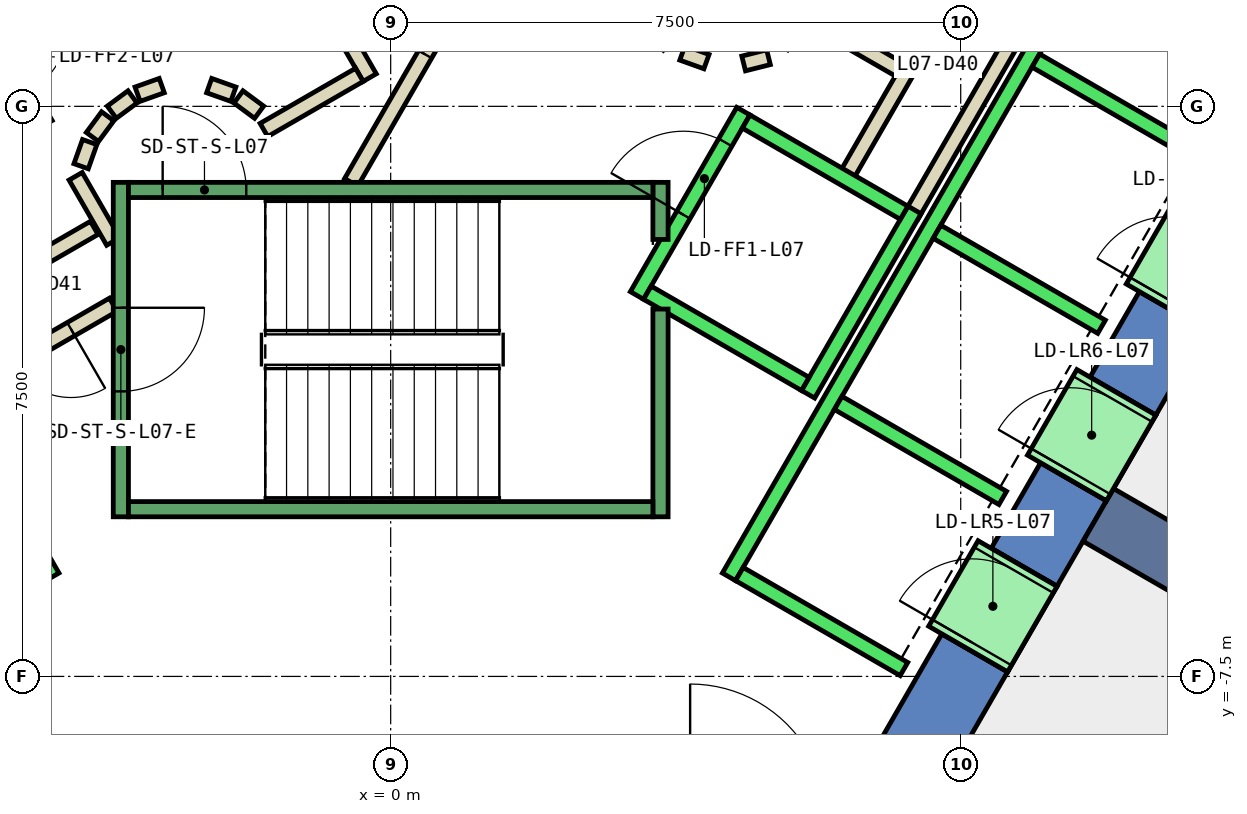
"""IFC4 building model, lengths in metres.
Left out: names, types, materials, properties, quantities, classifications, styles, units other than length and angle.
Written with IfcOpenShell. Run it as: python <this file> out.ifc"""

import sys

from ifc_helpers import new_model, si_unit, direction, frame, frame_2d, origin, place, context, subcontext, project, spatial, polyline, rectangle, outline, extrude, element, fill, save


model = new_model("IFC4")
c1 = context("Model", 3, precision=1e-05, world=origin(), true_north=direction((0.0, 1.0)))
c2 = subcontext(c1, "Body", "Model", "MODEL_VIEW")
j1 = project(units=[si_unit("LENGTHUNIT", "METRE"), si_unit("PLANEANGLEUNIT", "RADIAN")], contexts=[c1])
p1 = place(None, origin())
s1 = spatial("IfcSite", under=j1, at=p1, CompositionType="ELEMENT")
p2 = place(p1, origin())
s2 = spatial("IfcBuilding", under=s1, at=p2, CompositionType="ELEMENT")
p3 = place(p2, frame((0.0, 0.0, 39.2)))
s3 = spatial("IfcBuildingStorey", under=s2, at=p3, CompositionType="ELEMENT", Elevation=39.2)
p4 = place(p3, frame((0.0, 0.0, -0.4)))
e1 = element("IfcWall", 1, at=p4, inside=s3, PredefinedType="SHEAR", context=c2, shape_type="SweptSolid", body=[
    extrude(outline(polyline([(8.117, -7.44), (7.252, -6.94), (6.351, -8.5), (6.928, -9.5), (8.117, -7.44)])), origin(), (0.0, 0.0, 1.0), 4.2),
])
p5 = place(p3, frame((0.0, 0.0, -0.4)))
e2 = element("IfcWall", 2, at=p5, inside=s3, PredefinedType="SHEAR", context=c2, shape_type="SweptSolid", body=[
    extrude(outline(polyline([(9.417, -5.189), (8.551, -4.689), (7.902, -5.814), (8.767, -6.314), (9.417, -5.189)])), origin(), (0.0, 0.0, 1.0), 4.2),
])
p6 = place(p3, frame((0.0, 0.0, -0.4)))
e3 = element("IfcWall", 3, at=p6, inside=s3, PredefinedType="SHEAR", context=c2, shape_type="SweptSolid", body=[
    extrude(outline(polyline([(10.717, -2.937), (9.851, -2.437), (9.201, -3.563), (10.067, -4.063), (10.717, -2.937)])), origin(), (0.0, 0.0, 1.0), 4.2),
])
p7 = place(p3, frame((0.0, 0.0, 3.6)))
e4 = element("IfcWall", 4, at=p7, inside=s3, PredefinedType="SHEAR", context=c2, shape_type="SweptSolid", body=[
    extrude(outline(polyline([(8.767, -6.314), (7.902, -5.814), (7.252, -6.94), (8.117, -7.44), (8.767, -6.314)])), origin(), (0.0, 0.0, 1.0), 0.2),
])
p8 = place(p3, frame((0.0, 0.0, 3.6)))
e5 = element("IfcWall", 5, at=p8, inside=s3, PredefinedType="SHEAR", context=c2, shape_type="SweptSolid", body=[
    extrude(outline(polyline([(10.067, -4.063), (9.201, -3.563), (8.551, -4.689), (9.417, -5.189), (10.067, -4.063)])), origin(), (0.0, 0.0, 1.0), 0.2),
])
p9 = place(p3, frame((0.0, 0.0, 3.6)))
e6 = element("IfcWall", 6, at=p9, inside=s3, PredefinedType="SHEAR", context=c2, shape_type="SweptSolid", body=[
    extrude(outline(polyline([(11.367, -1.811), (10.501, -1.311), (9.851, -2.437), (10.717, -2.937), (11.367, -1.811)])), origin(), (0.0, 0.0, 1.0), 0.2),
])
p10 = place(p3, frame((9.31, -5.375, -0.4), z_axis=(0.0, 0.0, 1.0), x_axis=(0.866017533419, -0.500013631625, 0.0)))
e7 = element("IfcWall", 7, at=p10, inside=s3, PredefinedType="SHEAR", context=c2, shape_type="SweptSolid", body=[
    extrude(rectangle(XDim=9.0, YDim=0.8, at=frame_2d((4.5, 0.0))), origin(), (0.0, 0.0, 1.0), 4.2),
])
p11 = place(p3, frame((5.499, 1.172, 0.0), z_axis=(0.0, 0.0, 1.0), x_axis=(0.866333505267, -0.499465972466, 0.0)))
e8 = element("IfcWall", 8, at=p11, inside=s3, PredefinedType="PARTITIONING", context=c2, shape_type="SweptSolid", body=[
    extrude(rectangle(XDim=1.374, YDim=0.2, at=frame_2d((0.687, 0.0))), origin(), (0.0, 0.0, 1.0), 3.8),
])
p12 = place(p3, frame((6.826, 0.522, 0.0), z_axis=(0.0, 0.0, 1.0), x_axis=(-0.500016722714, -0.866015748706, 0.0)))
e9 = element("IfcWall", 9, at=p12, inside=s3, PredefinedType="PARTITIONING", context=c2, shape_type="SweptSolid", body=[
    extrude(rectangle(XDim=1.7, YDim=0.2, at=frame_2d((0.85, 0.0))), origin(), (0.0, 0.0, 1.0), 3.8),
])
p13 = place(p3, frame((8.192, 0.888, 0.0), z_axis=(0.0, 0.0, 1.0), x_axis=(-0.499940625693, -0.866059680843, 0.0)))
e10 = element("IfcWall", 10, at=p13, inside=s3, PredefinedType="PARTITIONING", context=c2, shape_type="SweptSolid", body=[
    extrude(rectangle(XDim=2.68, YDim=0.2, at=frame_2d((1.34, 0.0))), origin(), (0.0, 0.0, 1.0), 3.8),
])
p14 = place(p3, frame((-3.9, -1.599, 0.0), z_axis=(0.0, 0.0, 1.0), x_axis=(-0.865969445389, -0.500096910261, 0.0)))
e11 = element("IfcWall", 11, at=p14, inside=s3, PredefinedType="PARTITIONING", context=c2, shape_type="SweptSolid", body=[
    extrude(rectangle(XDim=1.373, YDim=0.2, at=frame_2d((0.687, 0.0))), origin(), (0.0, 0.0, 1.0), 3.8),
])
p15 = place(p3, frame((-3.65, -2.61, 0.0), z_axis=(0.0, 0.0, 1.0), x_axis=(-0.866072462134, -0.499918483688, 0.0)))
e12 = element("IfcWall", 12, at=p15, inside=s3, PredefinedType="PARTITIONING", context=c2, shape_type="SweptSolid", body=[
    extrude(rectangle(XDim=2.084, YDim=0.2, at=frame_2d((1.042, 0.0))), origin(), (0.0, 0.0, 1.0), 3.8),
])
p16 = place(p15, frame((0.642, 0.0, 0.0)))
e13 = element("IfcOpeningElement", 13, at=p16, cuts=e12, PredefinedType="OPENING", context=c2, shape_type="SweptSolid", body=[
    extrude(rectangle(XDim=0.9, YDim=2.1, at=frame_2d((0.45, 1.05))), frame((0.0, 0.11, 0.0), z_axis=(0.0, -1.0, 0.0), x_axis=(1.0, 0.0, 0.0)), (0.0, 0.0, 1.0), 0.22),
])
p17 = place(p3, frame((-4.145, -0.92, 0.0), z_axis=(0.0, 0.0, 1.0), x_axis=(0.499743786207, -0.866173278362, 0.0)))
e14 = element("IfcWall", 14, at=p17, inside=s3, PredefinedType="PARTITIONING", context=c2, shape_type="SweptSolid", body=[
    extrude(rectangle(XDim=0.991, YDim=0.2, at=frame_2d((0.495, 0.0))), origin(), (0.0, 0.0, 1.0), 3.8),
])
p18 = place(p3, frame((-0.52, -1.0, 0.0), z_axis=(0.0, 0.0, 1.0), x_axis=(0.50011622646, 0.865958290007, 0.0)))
e15 = element("IfcWall", 15, at=p18, inside=s3, PredefinedType="PARTITIONING", context=c2, shape_type="SweptSolid", body=[
    extrude(rectangle(XDim=4.991, YDim=0.2, at=frame_2d((2.496, 0.0))), origin(), (0.0, 0.0, 1.0), 3.8),
])
p19 = place(p18, frame((1.945, 0.0, 0.0)))
e16 = element("IfcOpeningElement", 16, at=p19, cuts=e15, PredefinedType="OPENING", context=c2, shape_type="SweptSolid", body=[
    extrude(rectangle(XDim=1.0, YDim=2.1, at=frame_2d((0.5, 1.05))), frame((0.0, 0.11, 0.0), z_axis=(0.0, -1.0, 0.0), x_axis=(1.0, 0.0, 0.0)), (0.0, 0.0, 1.0), 0.22),
])
p20 = place(p3, frame((3.838, 0.702, 0.0), z_axis=(0.0, 0.0, 1.0), x_axis=(0.941035081519, -0.338308993895, 0.0)))
e17 = element("IfcWall", 17, at=p20, inside=s3, PredefinedType="PARTITIONING", context=c2, shape_type="SweptSolid", body=[
    extrude(rectangle(XDim=0.337, YDim=0.2, at=frame_2d((0.168, 0.0))), origin(), (0.0, 0.0, 1.0), 3.8),
])
p21 = place(p3, frame((4.644, 0.564, 0.0), z_axis=(0.0, 0.0, 1.0), x_axis=(0.969929076366, 0.243387729394, 0.0)))
e18 = element("IfcWall", 18, at=p21, inside=s3, PredefinedType="PARTITIONING", context=c2, shape_type="SweptSolid", body=[
    extrude(rectangle(XDim=0.337, YDim=0.2, at=frame_2d((0.168, 0.0))), origin(), (0.0, 0.0, 1.0), 3.8),
])
p22 = place(p3, frame((-2.771, 4.7, 0.0), z_axis=(0.0, 0.0, 1.0), x_axis=(0.499969479948, -0.866043023828, 0.0)))
e19 = element("IfcWall", 19, at=p22, inside=s3, PredefinedType="PARTITIONING", context=c2, shape_type="SweptSolid", body=[
    extrude(rectangle(XDim=4.99, YDim=0.2, at=frame_2d((2.495, 0.0))), origin(), (0.0, 0.0, 1.0), 3.8),
])
p23 = place(p22, frame((1.945, 0.0, 0.0)))
e20 = element("IfcOpeningElement", 20, at=p23, cuts=e19, PredefinedType="OPENING", context=c2, shape_type="SweptSolid", body=[
    extrude(rectangle(XDim=1.0, YDim=2.1, at=frame_2d((0.5, 1.05))), frame((0.0, 0.11, 0.0), z_axis=(0.0, -1.0, 0.0), x_axis=(1.0, 0.0, 0.0)), (0.0, 0.0, 1.0), 0.22),
])
p24 = place(p3, frame((-0.412, 0.414, 0.0), z_axis=(0.0, 0.0, 1.0), x_axis=(-0.866017369001, -0.500013916395, 0.0)))
e21 = element("IfcWall", 21, at=p24, inside=s3, PredefinedType="PARTITIONING", context=c2, shape_type="SweptSolid", body=[
    extrude(rectangle(XDim=1.45, YDim=0.2, at=frame_2d((0.725, 0.0))), origin(), (0.0, 0.0, 1.0), 3.8),
])
p25 = place(p3, frame((-1.731, -0.077, 0.0), z_axis=(0.0, 0.0, 1.0), x_axis=(-0.804311165252, 0.594208338422, 0.0)))
e22 = element("IfcWall", 22, at=p25, inside=s3, PredefinedType="PARTITIONING", context=c2, shape_type="SweptSolid", body=[
    extrude(rectangle(XDim=0.338, YDim=0.2, at=frame_2d((0.169, 0.0))), origin(), (0.0, 0.0, 1.0), 3.8),
])
p26 = place(p3, frame((-2.07, 0.16, 0.0), z_axis=(0.0, 0.0, 1.0), x_axis=(-0.942199461132, 0.335052496547, 0.0)))
e23 = element("IfcWall", 23, at=p26, inside=s3, PredefinedType="PARTITIONING", context=c2, shape_type="SweptSolid", body=[
    extrude(rectangle(XDim=0.337, YDim=0.2, at=frame_2d((0.169, 0.0))), origin(), (0.0, 0.0, 1.0), 3.8),
])
p27 = place(p3, frame((-3.012, 0.273, 0.0), z_axis=(0.0, 0.0, 1.0), x_axis=(-0.942280615813, -0.334824194261, 0.0)))
e24 = element("IfcWall", 24, at=p27, inside=s3, PredefinedType="PARTITIONING", context=c2, shape_type="SweptSolid", body=[
    extrude(rectangle(XDim=0.338, YDim=0.2, at=frame_2d((0.169, 0.0))), origin(), (0.0, 0.0, 1.0), 3.8),
])
p28 = place(p3, frame((-3.397, 0.124, 0.0), z_axis=(0.0, 0.0, 1.0), x_axis=(-0.804311165252, -0.594208338422, 0.0)))
e25 = element("IfcWall", 25, at=p28, inside=s3, PredefinedType="PARTITIONING", context=c2, shape_type="SweptSolid", body=[
    extrude(rectangle(XDim=0.338, YDim=0.2, at=frame_2d((0.169, 0.0))), origin(), (0.0, 0.0, 1.0), 3.8),
])
p29 = place(p3, frame((-3.723, -0.131, 0.0), z_axis=(0.0, 0.0, 1.0), x_axis=(-0.594675113454, -0.803966112121, 0.0)))
e26 = element("IfcWall", 26, at=p29, inside=s3, PredefinedType="PARTITIONING", context=c2, shape_type="SweptSolid", body=[
    extrude(rectangle(XDim=0.338, YDim=0.2, at=frame_2d((0.169, 0.0))), origin(), (0.0, 0.0, 1.0), 3.8),
])
p30 = place(p3, frame((-3.96, -0.47, 0.0), z_axis=(0.0, 0.0, 1.0), x_axis=(-0.334824194261, -0.942280615813, 0.0)))
e27 = element("IfcWall", 27, at=p30, inside=s3, PredefinedType="PARTITIONING", context=c2, shape_type="SweptSolid", body=[
    extrude(rectangle(XDim=0.338, YDim=0.2, at=frame_2d((0.169, 0.0))), origin(), (0.0, 0.0, 1.0), 3.8),
])
p31 = place(p3, frame((12.401, -7.621, 0.0), z_axis=(0.0, 0.0, 1.0), x_axis=(-0.499983724212, -0.866034800411, 0.0)))
e28 = element("IfcWall", 28, at=p31, inside=s3, PredefinedType="PARTITIONING", context=c2, shape_type="SweptSolid", body=[
    extrude(rectangle(XDim=9.302, YDim=0.2, at=frame_2d((4.651, 0.0))), origin(), (0.0, 0.0, 1.0), 3.8),
])
p32 = place(p31, frame((1.429, 0.0, 0.0)))
e29 = element("IfcOpeningElement", 29, at=p32, cuts=e28, PredefinedType="OPENING", context=c2, shape_type="SweptSolid", body=[
    extrude(rectangle(XDim=1.0, YDim=2.1, at=frame_2d((0.5, 1.05))), frame((0.0, 0.11, 0.0), z_axis=(0.0, -1.0, 0.0), x_axis=(1.0, 0.0, 0.0)), (0.0, 0.0, 1.0), 0.22),
])
p33 = place(p31, frame((2.529, 0.0, 0.0)))
e30 = element("IfcOpeningElement", 30, at=p33, cuts=e28, PredefinedType="OPENING", context=c2, shape_type="SweptSolid", body=[
    extrude(rectangle(XDim=1.0, YDim=2.1, at=frame_2d((0.5, 1.05))), frame((0.0, 0.11, 0.0), z_axis=(0.0, -1.0, 0.0), x_axis=(1.0, 0.0, 0.0)), (0.0, 0.0, 1.0), 0.22),
])
p34 = place(p3, frame((-9.751, 2.99, 0.0), z_axis=(0.0, 0.0, 1.0), x_axis=(0.50000090737, -0.866024879913, 0.0)))
e31 = element("IfcWall", 31, at=p34, inside=s3, PredefinedType="STANDARD", context=c2, shape_type="SweptSolid", body=[
    extrude(rectangle(XDim=10.6, YDim=0.2, at=frame_2d((5.3, 0.0))), origin(), (0.0, 0.0, 1.0), 3.8),
])
p35 = place(p3, frame((3.24, -2.488, 0.0), z_axis=(0.0, 0.0, 1.0), x_axis=(0.49994636267, 0.866056369097, 0.0)))
e32 = element("IfcWall", 32, at=p35, inside=s3, PredefinedType="STANDARD", context=c2, shape_type="SweptSolid", body=[
    extrude(rectangle(XDim=2.8, YDim=0.2, at=frame_2d((1.4, 0.0))), origin(), (0.0, 0.0, 1.0), 3.8),
])
p36 = place(p35, frame((1.225, 0.0, 0.0)))
e33 = element("IfcOpeningElement", 33, at=p36, cuts=e32, PredefinedType="OPENING", context=c2, shape_type="SweptSolid", body=[
    extrude(rectangle(XDim=1.1, YDim=2.1, at=frame_2d((0.55, 1.05))), frame((0.0, 0.11, 0.0), z_axis=(0.0, -1.0, 0.0), x_axis=(1.0, 0.0, 0.0)), (0.0, 0.0, 1.0), 0.22),
])
p37 = place(p3, frame((5.492, -3.788, 0.0), z_axis=(0.0, 0.0, 1.0), x_axis=(0.500011755427, 0.866018616679, 0.0)))
e34 = element("IfcWall", 34, at=p37, inside=s3, PredefinedType="STANDARD", context=c2, shape_type="SweptSolid", body=[
    extrude(rectangle(XDim=2.8, YDim=0.2, at=frame_2d((1.4, 0.0))), origin(), (0.0, 0.0, 1.0), 3.8),
])
p38 = place(p3, frame((3.377, -2.452, 0.0), z_axis=(0.0, 0.0, 1.0), x_axis=(0.865955154139, -0.50012165622, 0.0)))
e35 = element("IfcWall", 35, at=p38, inside=s3, PredefinedType="STANDARD", context=c2, shape_type="SweptSolid", body=[
    extrude(rectangle(XDim=2.4, YDim=0.2, at=frame_2d((1.2, 0.0))), origin(), (0.0, 0.0, 1.0), 3.8),
])
p39 = place(p3, frame((4.677, -0.2, 0.0), z_axis=(0.0, 0.0, 1.0), x_axis=(0.865973769406, -0.500089422704, 0.0)))
e36 = element("IfcWall", 36, at=p39, inside=s3, PredefinedType="STANDARD", context=c2, shape_type="SweptSolid", body=[
    extrude(rectangle(XDim=2.399, YDim=0.2, at=frame_2d((1.2, 0.0))), origin(), (0.0, 0.0, 1.0), 3.8),
])
p40 = place(p3, frame((4.451, -6.19, 0.0), z_axis=(0.0, 0.0, 1.0), x_axis=(0.50000090737, 0.866024879913, 0.0)))
e37 = element("IfcWall", 37, at=p40, inside=s3, PredefinedType="STANDARD", context=c2, shape_type="SweptSolid", body=[
    extrude(rectangle(XDim=10.6, YDim=0.2, at=frame_2d((5.3, 0.0))), origin(), (0.0, 0.0, 1.0), 3.8),
])
for number, where, z_axis, x_axis in (
    (38, (4.588, -6.153, 0.0), (0.0, 0.0, 1.0), (0.866, -0.5, 0.0)),
    (39, (5.888, -3.902, 0.0), (0.0, 0.0, 1.0), (0.866, -0.5, 0.0)),
    (40, (7.188, -1.65, 0.0), (0.0, 0.0, 1.0), (0.866, -0.5, 0.0)),
    (41, (8.488, 0.602, 0.0), (0.0, 0.0, 1.0), (0.866, -0.5, 0.0)),
):
    element("IfcWall", number, at=place(p3, frame(where, z_axis=z_axis, x_axis=x_axis)), inside=s3, PredefinedType="STANDARD", context=c2, shape_type="SweptSolid", body=[
        extrude(rectangle(XDim=2.5, YDim=0.2, at=frame_2d((1.25, 0.0))), origin(), (0.0, 0.0, 1.0), 3.8),
    ])
p41 = place(p3, frame((7.598, -7.14, 0.0), z_axis=(0.0, 0.0, 1.0), x_axis=(0.500362116554, 0.865816234728, 0.0)))
e42 = element("IfcWall", 42, at=p41, inside=s3, PredefinedType="STANDARD", context=c2, shape_type="SweptSolid", body=[
    extrude(rectangle(XDim=1.299, YDim=1.2, at=frame_2d((0.65, 0.0))), origin(), (0.0, 0.0, 1.0), 2.4),
])
p42 = place(p41, frame((0.1, 0.0, 0.0)))
e43 = element("IfcOpeningElement", 43, at=p42, cuts=e42, PredefinedType="OPENING", context=c2, shape_type="SweptSolid", body=[
    extrude(rectangle(XDim=1.1, YDim=2.3, at=frame_2d((0.55, 1.15))), frame((0.0, 0.61, 0.0), z_axis=(0.0, -1.0, 0.0), x_axis=(1.0, 0.0, 0.0)), (0.0, 0.0, 1.0), 1.22),
])
p43 = place(p3, frame((8.898, -4.889, 0.0), z_axis=(0.0, 0.0, 1.0), x_axis=(0.500036693733, 0.866004217611, 0.0)))
e44 = element("IfcWall", 44, at=p43, inside=s3, PredefinedType="STANDARD", context=c2, shape_type="SweptSolid", body=[
    extrude(rectangle(XDim=1.3, YDim=1.2, at=frame_2d((0.65, 0.0))), origin(), (0.0, 0.0, 1.0), 2.4),
])
p44 = place(p43, frame((0.1, 0.0, 0.0)))
e45 = element("IfcOpeningElement", 45, at=p44, cuts=e44, PredefinedType="OPENING", context=c2, shape_type="SweptSolid", body=[
    extrude(rectangle(XDim=1.1, YDim=2.3, at=frame_2d((0.55, 1.15))), frame((0.0, 0.61, 0.0), z_axis=(0.0, -1.0, 0.0), x_axis=(1.0, 0.0, 0.0)), (0.0, 0.0, 1.0), 1.22),
])
p45 = place(p3, frame((10.198, -2.637, 0.0), z_axis=(0.0, 0.0, 1.0), x_axis=(0.49989585183, 0.866085525409, 0.0)))
e46 = element("IfcWall", 46, at=p45, inside=s3, PredefinedType="STANDARD", context=c2, shape_type="SweptSolid", body=[
    extrude(rectangle(XDim=1.3, YDim=1.2, at=frame_2d((0.65, 0.0))), origin(), (0.0, 0.0, 1.0), 2.4),
])
p46 = place(p45, frame((0.1, 0.0, 0.0)))
e47 = element("IfcOpeningElement", 47, at=p46, cuts=e46, PredefinedType="OPENING", context=c2, shape_type="SweptSolid", body=[
    extrude(rectangle(XDim=1.1, YDim=2.3, at=frame_2d((0.55, 1.15))), frame((0.0, 0.61, 0.0), z_axis=(0.0, -1.0, 0.0), x_axis=(1.0, 0.0, 0.0)), (0.0, 0.0, 1.0), 1.22),
])
p47 = place(p3, frame((-3.55, -1.0, 0.0), z_axis=(0.0, 0.0, 1.0), x_axis=(0.0, -1.0, 0.0)))
e48 = element("IfcWall", 48, at=p47, inside=s3, PredefinedType="STANDARD", context=c2, shape_type="SweptSolid", body=[
    extrude(rectangle(XDim=4.4, YDim=0.2, at=frame_2d((2.2, 0.0))), origin(), (0.0, 0.0, 1.0), 3.8),
])
p48 = place(p47, frame((1.65, 0.0, 0.0)))
e49 = element("IfcOpeningElement", 49, at=p48, cuts=e48, PredefinedType="OPENING", context=c2, shape_type="SweptSolid", body=[
    extrude(rectangle(XDim=1.1, YDim=2.2, at=frame_2d((0.55, 1.1))), frame((0.0, 0.11, 0.0), z_axis=(0.0, -1.0, 0.0), x_axis=(1.0, 0.0, 0.0)), (0.0, 0.0, 1.0), 0.22),
])
p49 = place(p3, frame((3.55, -2.667, 0.0), z_axis=(0.0, 0.0, 1.0), x_axis=(0.0, -1.0, 0.0)))
e50 = element("IfcWall", 50, at=p49, inside=s3, PredefinedType="STANDARD", context=c2, shape_type="SweptSolid", body=[
    extrude(rectangle(XDim=2.733, YDim=0.2, at=frame_2d((1.366, 0.0))), origin(), (0.0, 0.0, 1.0), 3.8),
])
p50 = place(p3, frame((3.55, -1.0, 0.0), z_axis=(0.0, 0.0, 1.0), x_axis=(0.0, -1.0, 0.0)))
e51 = element("IfcWall", 51, at=p50, inside=s3, PredefinedType="STANDARD", context=c2, shape_type="SweptSolid", body=[
    extrude(rectangle(XDim=0.751, YDim=0.2, at=frame_2d((0.375, 0.0))), origin(), (0.0, 0.0, 1.0), 3.8),
])
p51 = place(p3, frame((-3.45, -1.1, 0.0), z_axis=(0.0, 0.0, 1.0), x_axis=(1.0, 0.0, 0.0)))
e52 = element("IfcWall", 52, at=p51, inside=s3, PredefinedType="STANDARD", context=c2, shape_type="SweptSolid", body=[
    extrude(rectangle(XDim=6.9, YDim=0.2, at=frame_2d((3.45, 0.0))), origin(), (0.0, 0.0, 1.0), 3.8),
])
p52 = place(p51, frame((0.45, 0.0, 0.0)))
e53 = element("IfcOpeningElement", 53, at=p52, cuts=e52, PredefinedType="OPENING", context=c2, shape_type="SweptSolid", body=[
    extrude(rectangle(XDim=1.1, YDim=2.2, at=frame_2d((0.55, 1.1))), frame((0.0, 0.11, 0.0), z_axis=(0.0, -1.0, 0.0), x_axis=(1.0, 0.0, 0.0)), (0.0, 0.0, 1.0), 0.22),
])
p53 = place(p3, frame((-3.45, -5.3, 0.0), z_axis=(0.0, 0.0, 1.0), x_axis=(1.0, 0.0, 0.0)))
e54 = element("IfcWall", 54, at=p53, inside=s3, PredefinedType="STANDARD", context=c2, shape_type="SweptSolid", body=[
    extrude(rectangle(XDim=6.9, YDim=0.2, at=frame_2d((3.45, 0.0))), origin(), (0.0, 0.0, 1.0), 3.8),
])
p54 = place(p19, origin())
e55 = element("IfcDoor", 55, at=p54, inside=s3, OperationType="SINGLE_SWING_LEFT", PredefinedType="DOOR", context=c2, shape_type="SweptSolid", body=[
    extrude(rectangle(XDim=1.0, YDim=2.1, at=frame_2d((0.5, 1.05))), frame((0.0, 0.025, 0.0), z_axis=(0.0, -1.0, 0.0), x_axis=(1.0, 0.0, 0.0)), (0.0, 0.0, 1.0), 0.05),
])
fill(e16, e55)
p55 = place(p16, origin())
e56 = element("IfcDoor", 56, at=p55, inside=s3, OperationType="SINGLE_SWING_LEFT", PredefinedType="DOOR", context=c2, shape_type="SweptSolid", body=[
    extrude(rectangle(XDim=0.9, YDim=2.1, at=frame_2d((0.45, 1.05))), frame((0.0, 0.025, 0.0), z_axis=(0.0, -1.0, 0.0), x_axis=(1.0, 0.0, 0.0)), (0.0, 0.0, 1.0), 0.05),
])
fill(e13, e56)
p56 = place(p42, origin())
e57 = element("IfcDoor", 57, at=p56, inside=s3, OperationType="SLIDING_TO_LEFT", PredefinedType="DOOR", context=c2, shape_type="SweptSolid", body=[
    extrude(rectangle(XDim=1.1, YDim=2.3, at=frame_2d((0.55, 1.15))), frame((0.0, 0.025, 0.0), z_axis=(0.0, -1.0, 0.0), x_axis=(1.0, 0.0, 0.0)), (0.0, 0.0, 1.0), 0.05),
])
fill(e43, e57)
p57 = place(p44, origin())
e58 = element("IfcDoor", 58, at=p57, inside=s3, OperationType="SLIDING_TO_LEFT", PredefinedType="DOOR", context=c2, shape_type="SweptSolid", body=[
    extrude(rectangle(XDim=1.1, YDim=2.3, at=frame_2d((0.55, 1.15))), frame((0.0, 0.025, 0.0), z_axis=(0.0, -1.0, 0.0), x_axis=(1.0, 0.0, 0.0)), (0.0, 0.0, 1.0), 0.05),
])
fill(e45, e58)
p58 = place(p36, origin())
e59 = element("IfcDoor", 59, at=p58, inside=s3, OperationType="SLIDING_TO_LEFT", PredefinedType="DOOR", context=c2, shape_type="SweptSolid", body=[
    extrude(rectangle(XDim=1.1, YDim=2.1, at=frame_2d((0.55, 1.05))), frame((0.0, 0.025, 0.0), z_axis=(0.0, -1.0, 0.0), x_axis=(1.0, 0.0, 0.0)), (0.0, 0.0, 1.0), 0.05),
])
fill(e33, e59)
p59 = place(p52, origin())
e60 = element("IfcDoor", 60, at=p59, inside=s3, OperationType="SINGLE_SWING_LEFT", PredefinedType="DOOR", context=c2, shape_type="SweptSolid", body=[
    extrude(rectangle(XDim=1.1, YDim=2.2, at=frame_2d((0.55, 1.1))), frame((0.0, 0.025, 0.0), z_axis=(0.0, -1.0, 0.0), x_axis=(1.0, 0.0, 0.0)), (0.0, 0.0, 1.0), 0.05),
])
fill(e53, e60)
p60 = place(p48, origin())
e61 = element("IfcDoor", 61, at=p60, inside=s3, OperationType="SINGLE_SWING_LEFT", PredefinedType="DOOR", context=c2, shape_type="SweptSolid", body=[
    extrude(rectangle(XDim=1.1, YDim=2.2, at=frame_2d((0.55, 1.1))), frame((0.0, 0.025, 0.0), z_axis=(0.0, -1.0, 0.0), x_axis=(1.0, 0.0, 0.0)), (0.0, 0.0, 1.0), 0.05),
])
fill(e49, e61)
save(model, sys.argv[1])
